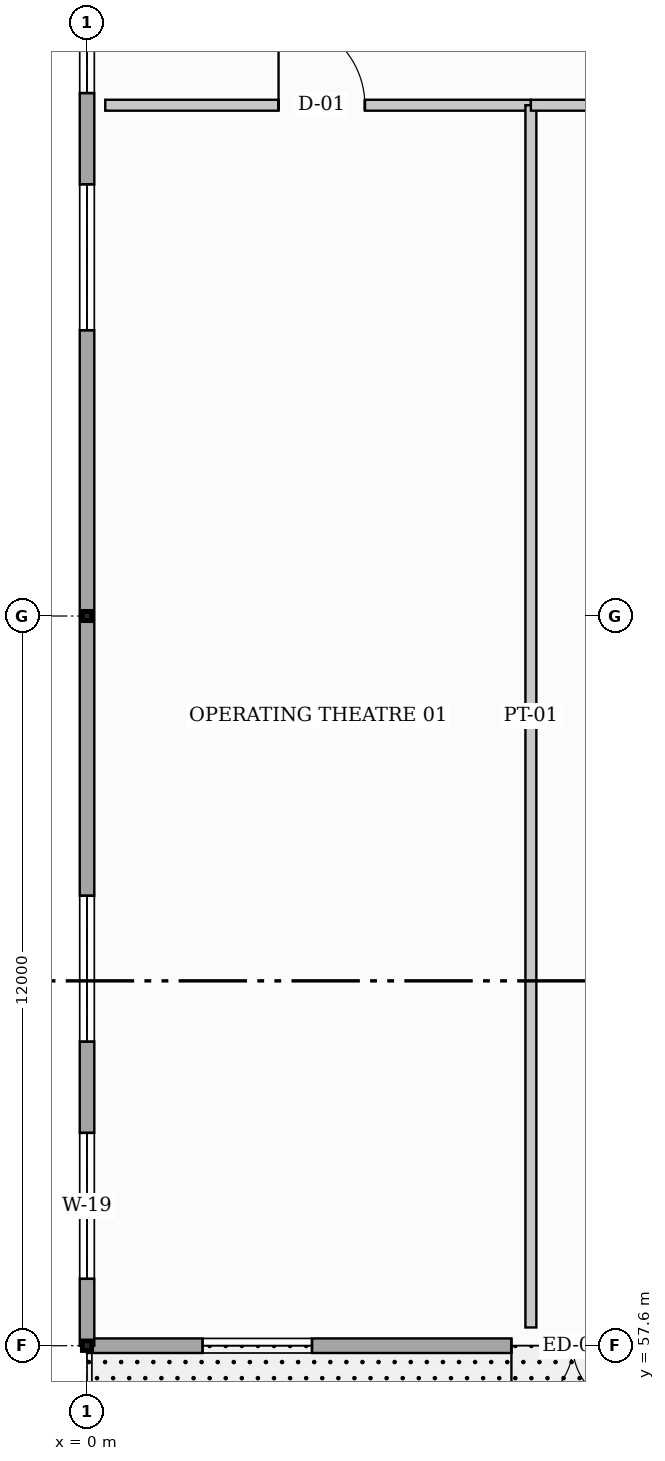
"""IFC4 building model, lengths in metres.
Left out: names, types, materials, properties, quantities, classifications, styles, units other than length and angle.
Written with IfcOpenShell. Run it as: python <this file> out.ifc"""

import sys

from ifc_helpers import new_model, si_unit, direction, frame, frame_2d, origin, origin_2d, place, context, subcontext, project, spatial, rectangle, i_section, extrude, element, fill, save


model = new_model("IFC4")
c1 = context("Model", 3, precision=1e-05, world=origin(), true_north=direction((0.0, 1.0)))
c2 = subcontext(c1, "Body", "Model", "MODEL_VIEW")
j1 = project(units=[si_unit("LENGTHUNIT", "METRE"), si_unit("PLANEANGLEUNIT", "RADIAN")], contexts=[c1])
p1 = place(None, origin())
s1 = spatial("IfcSite", under=j1, at=p1, CompositionType="ELEMENT")
p2 = place(p1, origin())
s2 = spatial("IfcBuilding", under=s1, at=p2, CompositionType="ELEMENT")
p3 = place(p2, frame((0.0, 0.0, 9.6)))
s3 = spatial("IfcBuildingStorey", under=s2, at=p3, CompositionType="ELEMENT", Elevation=9.6)
p4 = place(p3, frame((0.0, 57.6, 0.0), z_axis=(0.0, 0.0, 1.0), x_axis=(1.0, 0.0, 0.0)))
e1 = element("IfcColumn", 1, at=p4, inside=s3, PredefinedType="COLUMN", context=c2, shape_type="SweptSolid", body=[
    extrude(i_section(OverallWidth=0.153, OverallDepth=0.158, WebThickness=0.007, FlangeThickness=0.01, at=origin_2d()), origin(), (0.0, 0.0, 1.0), 4.8),
])
p5 = place(p3, frame((0.0, 69.6, 0.0), z_axis=(0.0, 0.0, 1.0), x_axis=(1.0, 0.0, 0.0)))
e2 = element("IfcColumn", 2, at=p5, inside=s3, PredefinedType="COLUMN", context=c2, shape_type="SweptSolid", body=[
    extrude(i_section(OverallWidth=0.152, OverallDepth=0.152, WebThickness=0.006, FlangeThickness=0.007, at=origin_2d()), origin(), (0.0, 0.0, 1.0), 4.8),
])
p6 = place(p3, frame((48.0, 57.6, 0.0), z_axis=(0.0, 0.0, 1.0), x_axis=(-1.0, 0.0, 0.0)))
e3 = element("IfcWall", 3, at=p6, inside=s3, PredefinedType="STANDARD", context=c2, shape_type="SweptSolid", body=[
    extrude(rectangle(XDim=48.0, YDim=0.24, at=frame_2d((24.0, 0.0))), origin(), (0.0, 0.0, 1.0), 3.465),
])
p7 = place(p6, frame((39.0, 0.0, 0.0)))
e4 = element("IfcOpeningElement", 4, at=p7, cuts=e3, PredefinedType="OPENING", context=c2, shape_type="SweptSolid", body=[
    extrude(rectangle(XDim=2.02, YDim=2.2, at=frame_2d((1.01, 1.1))), frame((0.0, 0.13, 0.0), z_axis=(0.0, -1.0, 0.0), x_axis=(1.0, 0.0, 0.0)), (0.0, 0.0, 1.0), 0.26),
])
p8 = place(p6, frame((1.1, 0.0, 2.1)))
e5 = element("IfcOpeningElement", 5, at=p8, cuts=e3, PredefinedType="OPENING", context=c2, shape_type="SweptSolid", body=[
    extrude(rectangle(XDim=1.8, YDim=0.9, at=frame_2d((0.9, 0.45))), frame((0.0, 0.13, 0.0), z_axis=(0.0, -1.0, 0.0), x_axis=(1.0, 0.0, 0.0)), (0.0, 0.0, 1.0), 0.26),
])
p9 = place(p6, frame((8.3, 0.0, 2.1)))
e6 = element("IfcOpeningElement", 6, at=p9, cuts=e3, PredefinedType="OPENING", context=c2, shape_type="SweptSolid", body=[
    extrude(rectangle(XDim=1.8, YDim=0.9, at=frame_2d((0.9, 0.45))), frame((0.0, 0.13, 0.0), z_axis=(0.0, -1.0, 0.0), x_axis=(1.0, 0.0, 0.0)), (0.0, 0.0, 1.0), 0.26),
])
p10 = place(p6, frame((15.5, 0.0, 2.1)))
e7 = element("IfcOpeningElement", 7, at=p10, cuts=e3, PredefinedType="OPENING", context=c2, shape_type="SweptSolid", body=[
    extrude(rectangle(XDim=1.8, YDim=0.9, at=frame_2d((0.9, 0.45))), frame((0.0, 0.13, 0.0), z_axis=(0.0, -1.0, 0.0), x_axis=(1.0, 0.0, 0.0)), (0.0, 0.0, 1.0), 0.26),
])
p11 = place(p6, frame((19.1, 0.0, 2.1)))
e8 = element("IfcOpeningElement", 8, at=p11, cuts=e3, PredefinedType="OPENING", context=c2, shape_type="SweptSolid", body=[
    extrude(rectangle(XDim=1.8, YDim=0.9, at=frame_2d((0.9, 0.45))), frame((0.0, 0.13, 0.0), z_axis=(0.0, -1.0, 0.0), x_axis=(1.0, 0.0, 0.0)), (0.0, 0.0, 1.0), 0.26),
])
p12 = place(p6, frame((26.3, 0.0, 2.1)))
e9 = element("IfcOpeningElement", 9, at=p12, cuts=e3, PredefinedType="OPENING", context=c2, shape_type="SweptSolid", body=[
    extrude(rectangle(XDim=1.8, YDim=0.9, at=frame_2d((0.9, 0.45))), frame((0.0, 0.13, 0.0), z_axis=(0.0, -1.0, 0.0), x_axis=(1.0, 0.0, 0.0)), (0.0, 0.0, 1.0), 0.26),
])
p13 = place(p6, frame((44.3, 0.0, 2.1)))
e10 = element("IfcOpeningElement", 10, at=p13, cuts=e3, PredefinedType="OPENING", context=c2, shape_type="SweptSolid", body=[
    extrude(rectangle(XDim=1.8, YDim=0.9, at=frame_2d((0.9, 0.45))), frame((0.0, 0.13, 0.0), z_axis=(0.0, -1.0, 0.0), x_axis=(1.0, 0.0, 0.0)), (0.0, 0.0, 1.0), 0.26),
])
p14 = place(p3, frame((0.0, 57.6, 0.0), z_axis=(0.0, 0.0, 1.0), x_axis=(0.0, 1.0, 0.0)))
e11 = element("IfcWall", 11, at=p14, inside=s3, PredefinedType="STANDARD", context=c2, shape_type="SweptSolid", body=[
    extrude(rectangle(XDim=57.6, YDim=0.24, at=frame_2d((28.8, 0.0))), origin(), (0.0, 0.0, 1.0), 3.465),
])
p15 = place(p14, frame((1.1, 0.0, 2.1)))
e12 = element("IfcOpeningElement", 12, at=p15, cuts=e11, PredefinedType="OPENING", context=c2, shape_type="SweptSolid", body=[
    extrude(rectangle(XDim=2.4, YDim=0.9, at=frame_2d((1.2, 0.45))), frame((0.0, 0.13, 0.0), z_axis=(0.0, -1.0, 0.0), x_axis=(1.0, 0.0, 0.0)), (0.0, 0.0, 1.0), 0.26),
])
p16 = place(p14, frame((5.0, 0.0, 2.1)))
e13 = element("IfcOpeningElement", 13, at=p16, cuts=e11, PredefinedType="OPENING", context=c2, shape_type="SweptSolid", body=[
    extrude(rectangle(XDim=2.4, YDim=0.9, at=frame_2d((1.2, 0.45))), frame((0.0, 0.13, 0.0), z_axis=(0.0, -1.0, 0.0), x_axis=(1.0, 0.0, 0.0)), (0.0, 0.0, 1.0), 0.26),
])
p17 = place(p14, frame((16.7, 0.0, 2.1)))
e14 = element("IfcOpeningElement", 14, at=p17, cuts=e11, PredefinedType="OPENING", context=c2, shape_type="SweptSolid", body=[
    extrude(rectangle(XDim=2.4, YDim=0.9, at=frame_2d((1.2, 0.45))), frame((0.0, 0.13, 0.0), z_axis=(0.0, -1.0, 0.0), x_axis=(1.0, 0.0, 0.0)), (0.0, 0.0, 1.0), 0.26),
])
p18 = place(p14, frame((20.6, 0.0, 2.1)))
e15 = element("IfcOpeningElement", 15, at=p18, cuts=e11, PredefinedType="OPENING", context=c2, shape_type="SweptSolid", body=[
    extrude(rectangle(XDim=2.4, YDim=0.9, at=frame_2d((1.2, 0.45))), frame((0.0, 0.13, 0.0), z_axis=(0.0, -1.0, 0.0), x_axis=(1.0, 0.0, 0.0)), (0.0, 0.0, 1.0), 0.26),
])
p19 = place(p14, frame((28.4, 0.0, 2.1)))
e16 = element("IfcOpeningElement", 16, at=p19, cuts=e11, PredefinedType="OPENING", context=c2, shape_type="SweptSolid", body=[
    extrude(rectangle(XDim=2.4, YDim=0.9, at=frame_2d((1.2, 0.45))), frame((0.0, 0.13, 0.0), z_axis=(0.0, -1.0, 0.0), x_axis=(1.0, 0.0, 0.0)), (0.0, 0.0, 1.0), 0.26),
])
p20 = place(p14, frame((32.3, 0.0, 2.1)))
e17 = element("IfcOpeningElement", 17, at=p20, cuts=e11, PredefinedType="OPENING", context=c2, shape_type="SweptSolid", body=[
    extrude(rectangle(XDim=2.4, YDim=0.9, at=frame_2d((1.2, 0.45))), frame((0.0, 0.13, 0.0), z_axis=(0.0, -1.0, 0.0), x_axis=(1.0, 0.0, 0.0)), (0.0, 0.0, 1.0), 0.26),
])
p21 = place(p14, frame((40.1, 0.0, 2.1)))
e18 = element("IfcOpeningElement", 18, at=p21, cuts=e11, PredefinedType="OPENING", context=c2, shape_type="SweptSolid", body=[
    extrude(rectangle(XDim=2.4, YDim=0.9, at=frame_2d((1.2, 0.45))), frame((0.0, 0.13, 0.0), z_axis=(0.0, -1.0, 0.0), x_axis=(1.0, 0.0, 0.0)), (0.0, 0.0, 1.0), 0.26),
])
p22 = place(p14, frame((47.9, 0.0, 2.1)))
e19 = element("IfcOpeningElement", 19, at=p22, cuts=e11, PredefinedType="OPENING", context=c2, shape_type="SweptSolid", body=[
    extrude(rectangle(XDim=2.4, YDim=0.9, at=frame_2d((1.2, 0.45))), frame((0.0, 0.13, 0.0), z_axis=(0.0, -1.0, 0.0), x_axis=(1.0, 0.0, 0.0)), (0.0, 0.0, 1.0), 0.26),
])
p23 = place(p14, frame((51.8, 0.0, 2.1)))
e20 = element("IfcOpeningElement", 20, at=p23, cuts=e11, PredefinedType="OPENING", context=c2, shape_type="SweptSolid", body=[
    extrude(rectangle(XDim=2.4, YDim=0.9, at=frame_2d((1.2, 0.45))), frame((0.0, 0.13, 0.0), z_axis=(0.0, -1.0, 0.0), x_axis=(1.0, 0.0, 0.0)), (0.0, 0.0, 1.0), 0.26),
])
p24 = place(p3, frame((0.3, 78.0, 0.0), z_axis=(0.0, 0.0, 1.0), x_axis=(1.0, 0.0, 0.0)))
e21 = element("IfcWall", 21, at=p24, inside=s3, PredefinedType="PARTITIONING", context=c2, shape_type="SweptSolid", body=[
    extrude(rectangle(XDim=7.0, YDim=0.18, at=frame_2d((3.5, 0.0))), origin(), (0.0, 0.0, 1.0), 4.065),
])
p25 = place(p24, frame((2.85, 0.0, 0.0)))
e22 = element("IfcOpeningElement", 22, at=p25, cuts=e21, PredefinedType="OPENING", context=c2, shape_type="SweptSolid", body=[
    extrude(rectangle(XDim=1.42, YDim=2.22, at=frame_2d((0.71, 1.11))), frame((0.0, 0.1, 0.0), z_axis=(0.0, -1.0, 0.0), x_axis=(1.0, 0.0, 0.0)), (0.0, 0.0, 1.0), 0.2),
])
p26 = place(p3, frame((7.3, 57.9, 0.0), z_axis=(0.0, 0.0, 1.0), x_axis=(0.0, 1.0, 0.0)))
e23 = element("IfcWall", 23, at=p26, inside=s3, PredefinedType="PARTITIONING", context=c2, shape_type="SweptSolid", body=[
    extrude(rectangle(XDim=20.1, YDim=0.18, at=frame_2d((10.05, 0.0))), origin(), (0.0, 0.0, 1.0), 3.882),
])
p27 = place(p3, frame((7.3, 78.0, 0.0), z_axis=(0.0, 0.0, 1.0), x_axis=(1.0, 0.0, 0.0)))
e24 = element("IfcWall", 24, at=p27, inside=s3, PredefinedType="PARTITIONING", context=c2, shape_type="SweptSolid", body=[
    extrude(rectangle(XDim=7.0, YDim=0.18, at=frame_2d((3.5, 0.0))), origin(), (0.0, 0.0, 1.0), 3.465),
])
p28 = place(p27, frame((2.85, 0.0, 0.0)))
e25 = element("IfcOpeningElement", 25, at=p28, cuts=e24, PredefinedType="OPENING", context=c2, shape_type="SweptSolid", body=[
    extrude(rectangle(XDim=1.3, YDim=2.16, at=frame_2d((0.65, 1.08))), frame((0.0, 0.1, 0.0), z_axis=(0.0, -1.0, 0.0), x_axis=(1.0, 0.0, 0.0)), (0.0, 0.0, 1.0), 0.2),
])
p29 = place(p7, origin())
e26 = element("IfcDoor", 26, at=p29, inside=s3, OperationType="DOUBLE_DOOR_SINGLE_SWING", PredefinedType="DOOR", context=c2, shape_type="SweptSolid", body=[
    extrude(rectangle(XDim=2.02, YDim=2.2, at=frame_2d((1.01, 1.1))), frame((0.0, 0.025, 0.0), z_axis=(0.0, -1.0, 0.0), x_axis=(1.0, 0.0, 0.0)), (0.0, 0.0, 1.0), 0.05),
])
fill(e4, e26)
p30 = place(p13, origin())
e27 = element("IfcWindow", 27, at=p30, inside=s3, PartitioningType="DOUBLE_PANEL_HORIZONTAL", PredefinedType="WINDOW", context=c2, shape_type="SweptSolid", body=[
    extrude(rectangle(XDim=1.8, YDim=0.9, at=frame_2d((0.9, 0.45))), frame((0.0, 0.03, 0.0), z_axis=(0.0, -1.0, 0.0), x_axis=(1.0, 0.0, 0.0)), (0.0, 0.0, 1.0), 0.06),
])
fill(e10, e27)
p31 = place(p15, origin())
e28 = element("IfcWindow", 28, at=p31, inside=s3, PartitioningType="DOUBLE_PANEL_HORIZONTAL", PredefinedType="WINDOW", context=c2, shape_type="SweptSolid", body=[
    extrude(rectangle(XDim=2.4, YDim=0.9, at=frame_2d((1.2, 0.45))), frame((0.0, 0.03, 0.0), z_axis=(0.0, -1.0, 0.0), x_axis=(1.0, 0.0, 0.0)), (0.0, 0.0, 1.0), 0.06),
])
fill(e12, e28)
p32 = place(p16, origin())
e29 = element("IfcWindow", 29, at=p32, inside=s3, PartitioningType="DOUBLE_PANEL_HORIZONTAL", PredefinedType="WINDOW", context=c2, shape_type="SweptSolid", body=[
    extrude(rectangle(XDim=2.4, YDim=0.9, at=frame_2d((1.2, 0.45))), frame((0.0, 0.03, 0.0), z_axis=(0.0, -1.0, 0.0), x_axis=(1.0, 0.0, 0.0)), (0.0, 0.0, 1.0), 0.06),
])
fill(e13, e29)
p33 = place(p17, origin())
e30 = element("IfcWindow", 30, at=p33, inside=s3, PartitioningType="DOUBLE_PANEL_HORIZONTAL", PredefinedType="WINDOW", context=c2, shape_type="SweptSolid", body=[
    extrude(rectangle(XDim=2.4, YDim=0.9, at=frame_2d((1.2, 0.45))), frame((0.0, 0.03, 0.0), z_axis=(0.0, -1.0, 0.0), x_axis=(1.0, 0.0, 0.0)), (0.0, 0.0, 1.0), 0.06),
])
fill(e14, e30)
p34 = place(p18, origin())
e31 = element("IfcWindow", 31, at=p34, inside=s3, PartitioningType="DOUBLE_PANEL_HORIZONTAL", PredefinedType="WINDOW", context=c2, shape_type="SweptSolid", body=[
    extrude(rectangle(XDim=2.4, YDim=0.9, at=frame_2d((1.2, 0.45))), frame((0.0, 0.03, 0.0), z_axis=(0.0, -1.0, 0.0), x_axis=(1.0, 0.0, 0.0)), (0.0, 0.0, 1.0), 0.06),
])
fill(e15, e31)
p35 = place(p25, origin())
e32 = element("IfcDoor", 32, at=p35, inside=s3, OperationType="SINGLE_SWING_LEFT", PredefinedType="DOOR", context=c2, shape_type="SweptSolid", body=[
    extrude(rectangle(XDim=1.42, YDim=2.22, at=frame_2d((0.71, 1.11))), frame((0.0, 0.025, 0.0), z_axis=(0.0, -1.0, 0.0), x_axis=(1.0, 0.0, 0.0)), (0.0, 0.0, 1.0), 0.05),
])
fill(e22, e32)
save(model, sys.argv[1])
